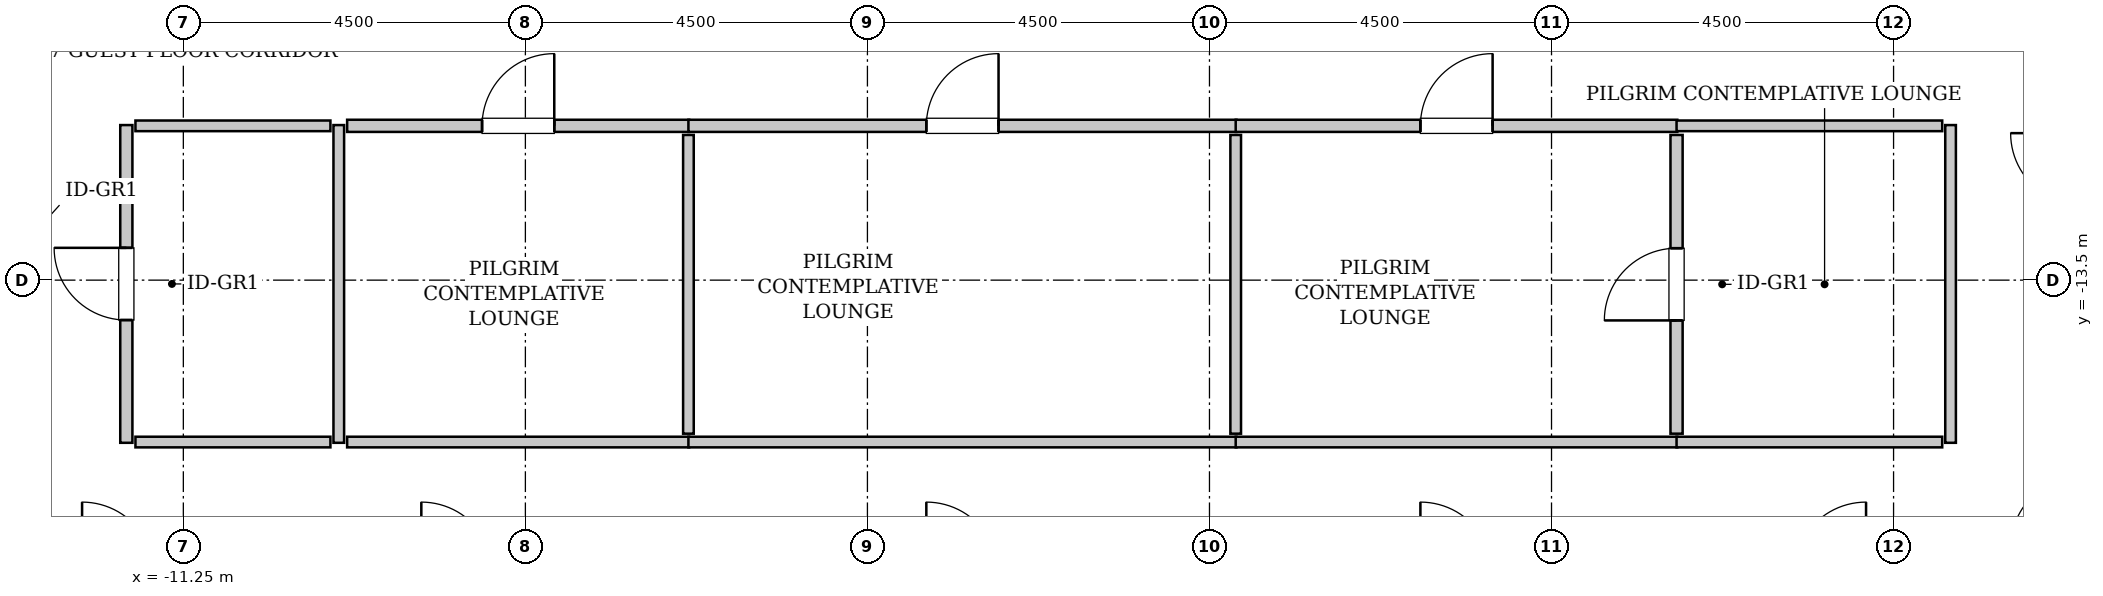
"""IFC4 building model, lengths in metres.
Left out: names, types, materials, properties, quantities, classifications, styles, units other than length and angle.
Written with IfcOpenShell. Run it as: python <this file> out.ifc"""

import sys

from ifc_helpers import new_model, si_unit, direction, frame, frame_2d, origin, place, context, subcontext, project, spatial, rectangle, extrude, source, transform, mapped, element, fill, save


model = new_model("IFC4")
c1 = context("Model", 3, precision=1e-05, world=origin(), true_north=direction((0.0, 1.0)))
c2 = subcontext(c1, "Body", "Model", "MODEL_VIEW")
j1 = project(units=[si_unit("LENGTHUNIT", "METRE"), si_unit("PLANEANGLEUNIT", "RADIAN")], contexts=[c1])
p1 = place(None, origin())
s1 = spatial("IfcSite", under=j1, at=p1, CompositionType="ELEMENT")
p2 = place(p1, origin())
s2 = spatial("IfcBuilding", under=s1, at=p2, CompositionType="ELEMENT")
p3 = place(p2, frame((0.0, 0.0, 152.6)))
s3 = spatial("IfcBuildingStorey", under=s2, at=p3, CompositionType="ELEMENT", Elevation=152.6)
m1 = source(origin(), c2, "Body", "SweptSolid", [
    extrude(rectangle(XDim=4.18, YDim=0.16, at=frame_2d((2.09, 0.0))), origin(), (0.0, 0.0, 1.0), 3.535),
])
p4 = place(p3, frame((-12.0, -15.64, 0.0), z_axis=(0.0, 0.0, 1.0), x_axis=(0.0, 1.0, 0.0)))
e1 = element("IfcWall", 1, at=p4, inside=s3, PredefinedType="PARTITIONING", context=c2, shape_type="MappedRepresentation", body=[
    mapped(m1, transform((0.0, 0.0, 0.0), x_axis=(1.0, 0.0, 0.0), y_axis=(0.0, 1.0, 0.0), z_axis=(0.0, 0.0, 1.0), scale=1.0)),
])
p5 = place(p4, frame((1.615, 0.0, 0.0)))
e2 = element("IfcOpeningElement", 2, at=p5, cuts=e1, PredefinedType="OPENING", context=c2, shape_type="SweptSolid", body=[
    extrude(rectangle(XDim=0.95, YDim=2.1, at=frame_2d((0.475, 1.05))), frame((0.0, 0.09, 0.0), z_axis=(0.0, -1.0, 0.0), x_axis=(1.0, 0.0, 0.0)), (0.0, 0.0, 1.0), 0.18),
])
m2 = source(origin(), c2, "Body", "SweptSolid", [
    extrude(rectangle(XDim=4.18, YDim=0.14, at=frame_2d((2.09, 0.0))), origin(), (0.0, 0.0, 1.0), 3.535),
])
p6 = place(p3, frame((-9.205, -15.64, 0.0), z_axis=(0.0, 0.0, 1.0), x_axis=(0.0, 1.0, 0.0)))
e3 = element("IfcWall", 3, at=p6, inside=s3, PredefinedType="PARTITIONING", context=c2, shape_type="MappedRepresentation", body=[
    mapped(m2, transform((0.0, 0.0, 0.0), x_axis=(1.0, 0.0, 0.0), y_axis=(0.0, 1.0, 0.0), z_axis=(0.0, 0.0, 1.0), scale=1.0)),
])
m3 = source(origin(), c2, "Body", "SweptSolid", [
    extrude(rectangle(XDim=2.565, YDim=0.14, at=frame_2d((1.282, 0.0))), origin(), (0.0, 0.0, 1.0), 3.535),
])
for number, where, z_axis, x_axis in (
    (4, (-11.88, -11.47, 0.0), (0.0, 0.0, 1.0), (1.0, 0.0, 0.0)),
    (5, (-11.88, -15.63, 0.0), (0.0, 0.0, 1.0), (1.0, 0.0, 0.0)),
):
    element("IfcWall", number, at=place(p3, frame(where, z_axis=z_axis, x_axis=x_axis)), inside=s3, PredefinedType="PARTITIONING", context=c2, shape_type="MappedRepresentation", body=[
        mapped(m3, transform((0.0, 0.0, 0.0), x_axis=(1.0, 0.0, 0.0), y_axis=(0.0, 1.0, 0.0), z_axis=(0.0, 0.0, 1.0), scale=1.0)),
    ])
m4 = source(origin(), c2, "Body", "SweptSolid", [
    extrude(rectangle(XDim=4.5, YDim=0.16, at=frame_2d((2.25, 0.0))), origin(), (0.0, 0.0, 1.0), 3.535),
])
p7 = place(p3, frame((-9.095, -11.47, 0.0), z_axis=(0.0, 0.0, 1.0), x_axis=(1.0, 0.0, 0.0)))
e6 = element("IfcWall", 6, at=p7, inside=s3, PredefinedType="PARTITIONING", context=c2, shape_type="MappedRepresentation", body=[
    mapped(m4, transform((0.0, 0.0, 0.0), x_axis=(1.0, 0.0, 0.0), y_axis=(0.0, 1.0, 0.0), z_axis=(0.0, 0.0, 1.0), scale=1.0)),
])
p8 = place(p7, frame((1.775, 0.0, 0.0)))
e7 = element("IfcOpeningElement", 7, at=p8, cuts=e6, PredefinedType="OPENING", context=c2, shape_type="SweptSolid", body=[
    extrude(rectangle(XDim=0.95, YDim=2.1, at=frame_2d((0.475, 1.05))), frame((0.0, 0.09, 0.0), z_axis=(0.0, -1.0, 0.0), x_axis=(1.0, 0.0, 0.0)), (0.0, 0.0, 1.0), 0.18),
])
m5 = source(origin(), c2, "Body", "SweptSolid", [
    extrude(rectangle(XDim=4.5, YDim=0.14, at=frame_2d((2.25, 0.0))), origin(), (0.0, 0.0, 1.0), 3.535),
])
p9 = place(p3, frame((-9.095, -15.63, 0.0), z_axis=(0.0, 0.0, 1.0), x_axis=(1.0, 0.0, 0.0)))
e8 = element("IfcWall", 8, at=p9, inside=s3, PredefinedType="PARTITIONING", context=c2, shape_type="MappedRepresentation", body=[
    mapped(m5, transform((0.0, 0.0, 0.0), x_axis=(1.0, 0.0, 0.0), y_axis=(0.0, 1.0, 0.0), z_axis=(0.0, 0.0, 1.0), scale=1.0)),
])
m6 = source(origin(), c2, "Body", "SweptSolid", [
    extrude(rectangle(XDim=3.93, YDim=0.14, at=frame_2d((1.965, 0.0))), origin(), (0.0, 0.0, 1.0), 3.535),
])
p10 = place(p3, frame((-4.605, -15.52, 0.0), z_axis=(0.0, 0.0, 1.0), x_axis=(0.0, 1.0, 0.0)))
e9 = element("IfcWall", 9, at=p10, inside=s3, PredefinedType="PARTITIONING", context=c2, shape_type="MappedRepresentation", body=[
    mapped(m6, transform((0.0, 0.0, 0.0), x_axis=(1.0, 0.0, 0.0), y_axis=(0.0, 1.0, 0.0), z_axis=(0.0, 0.0, 1.0), scale=1.0)),
])
m7 = source(origin(), c2, "Body", "SweptSolid", [
    extrude(rectangle(XDim=7.21, YDim=0.16, at=frame_2d((3.605, 0.0))), origin(), (0.0, 0.0, 1.0), 3.535),
])
p11 = place(p3, frame((-4.605, -11.47, 0.0), z_axis=(0.0, 0.0, 1.0), x_axis=(1.0, 0.0, 0.0)))
e10 = element("IfcWall", 10, at=p11, inside=s3, PredefinedType="PARTITIONING", context=c2, shape_type="MappedRepresentation", body=[
    mapped(m7, transform((0.0, 0.0, 0.0), x_axis=(1.0, 0.0, 0.0), y_axis=(0.0, 1.0, 0.0), z_axis=(0.0, 0.0, 1.0), scale=1.0)),
])
p12 = place(p11, frame((3.13, 0.0, 0.0)))
e11 = element("IfcOpeningElement", 11, at=p12, cuts=e10, PredefinedType="OPENING", context=c2, shape_type="SweptSolid", body=[
    extrude(rectangle(XDim=0.95, YDim=2.1, at=frame_2d((0.475, 1.05))), frame((0.0, 0.09, 0.0), z_axis=(0.0, -1.0, 0.0), x_axis=(1.0, 0.0, 0.0)), (0.0, 0.0, 1.0), 0.18),
])
m8 = source(origin(), c2, "Body", "SweptSolid", [
    extrude(rectangle(XDim=7.21, YDim=0.14, at=frame_2d((3.605, 0.0))), origin(), (0.0, 0.0, 1.0), 3.535),
])
p13 = place(p3, frame((-4.605, -15.63, 0.0), z_axis=(0.0, 0.0, 1.0), x_axis=(1.0, 0.0, 0.0)))
e12 = element("IfcWall", 12, at=p13, inside=s3, PredefinedType="PARTITIONING", context=c2, shape_type="MappedRepresentation", body=[
    mapped(m8, transform((0.0, 0.0, 0.0), x_axis=(1.0, 0.0, 0.0), y_axis=(0.0, 1.0, 0.0), z_axis=(0.0, 0.0, 1.0), scale=1.0)),
])
p14 = place(p3, frame((2.595, -15.52, 0.0), z_axis=(0.0, 0.0, 1.0), x_axis=(0.0, 1.0, 0.0)))
e13 = element("IfcWall", 13, at=p14, inside=s3, PredefinedType="PARTITIONING", context=c2, shape_type="MappedRepresentation", body=[
    mapped(m6, transform((0.0, 0.0, 0.0), x_axis=(1.0, 0.0, 0.0), y_axis=(0.0, 1.0, 0.0), z_axis=(0.0, 0.0, 1.0), scale=1.0)),
])
m9 = source(origin(), c2, "Body", "SweptSolid", [
    extrude(rectangle(XDim=5.81, YDim=0.16, at=frame_2d((2.905, 0.0))), origin(), (0.0, 0.0, 1.0), 3.535),
])
p15 = place(p3, frame((2.595, -11.47, 0.0), z_axis=(0.0, 0.0, 1.0), x_axis=(1.0, 0.0, 0.0)))
e14 = element("IfcWall", 14, at=p15, inside=s3, PredefinedType="PARTITIONING", context=c2, shape_type="MappedRepresentation", body=[
    mapped(m9, transform((0.0, 0.0, 0.0), x_axis=(1.0, 0.0, 0.0), y_axis=(0.0, 1.0, 0.0), z_axis=(0.0, 0.0, 1.0), scale=1.0)),
])
p16 = place(p15, frame((2.43, 0.0, 0.0)))
e15 = element("IfcOpeningElement", 15, at=p16, cuts=e14, PredefinedType="OPENING", context=c2, shape_type="SweptSolid", body=[
    extrude(rectangle(XDim=0.95, YDim=2.1, at=frame_2d((0.475, 1.05))), frame((0.0, 0.09, 0.0), z_axis=(0.0, -1.0, 0.0), x_axis=(1.0, 0.0, 0.0)), (0.0, 0.0, 1.0), 0.18),
])
m10 = source(origin(), c2, "Body", "SweptSolid", [
    extrude(rectangle(XDim=5.81, YDim=0.14, at=frame_2d((2.905, 0.0))), origin(), (0.0, 0.0, 1.0), 3.535),
])
p17 = place(p3, frame((2.595, -15.63, 0.0), z_axis=(0.0, 0.0, 1.0), x_axis=(1.0, 0.0, 0.0)))
e16 = element("IfcWall", 16, at=p17, inside=s3, PredefinedType="PARTITIONING", context=c2, shape_type="MappedRepresentation", body=[
    mapped(m10, transform((0.0, 0.0, 0.0), x_axis=(1.0, 0.0, 0.0), y_axis=(0.0, 1.0, 0.0), z_axis=(0.0, 0.0, 1.0), scale=1.0)),
])
m11 = source(origin(), c2, "Body", "SweptSolid", [
    extrude(rectangle(XDim=3.93, YDim=0.16, at=frame_2d((1.965, 0.0))), origin(), (0.0, 0.0, 1.0), 3.535),
])
p18 = place(p3, frame((8.395, -15.52, 0.0), z_axis=(0.0, 0.0, 1.0), x_axis=(0.0, 1.0, 0.0)))
e17 = element("IfcWall", 17, at=p18, inside=s3, PredefinedType="PARTITIONING", context=c2, shape_type="MappedRepresentation", body=[
    mapped(m11, transform((0.0, 0.0, 0.0), x_axis=(1.0, 0.0, 0.0), y_axis=(0.0, 1.0, 0.0), z_axis=(0.0, 0.0, 1.0), scale=1.0)),
])
p19 = place(p18, frame((1.49, 0.0, 0.0)))
e18 = element("IfcOpeningElement", 18, at=p19, cuts=e17, PredefinedType="OPENING", context=c2, shape_type="SweptSolid", body=[
    extrude(rectangle(XDim=0.95, YDim=2.1, at=frame_2d((0.475, 1.05))), frame((0.0, 0.09, 0.0), z_axis=(0.0, -1.0, 0.0), x_axis=(1.0, 0.0, 0.0)), (0.0, 0.0, 1.0), 0.18),
])
p20 = place(p3, frame((12.0, -15.64, 0.0), z_axis=(0.0, 0.0, 1.0), x_axis=(0.0, 1.0, 0.0)))
e19 = element("IfcWall", 19, at=p20, inside=s3, PredefinedType="PARTITIONING", context=c2, shape_type="MappedRepresentation", body=[
    mapped(m2, transform((0.0, 0.0, 0.0), x_axis=(1.0, 0.0, 0.0), y_axis=(0.0, 1.0, 0.0), z_axis=(0.0, 0.0, 1.0), scale=1.0)),
])
m12 = source(origin(), c2, "Body", "SweptSolid", [
    extrude(rectangle(XDim=3.495, YDim=0.14, at=frame_2d((1.748, 0.0))), origin(), (0.0, 0.0, 1.0), 3.535),
])
for number, where, z_axis, x_axis in (
    (20, (8.395, -11.47, 0.0), (0.0, 0.0, 1.0), (1.0, 0.0, 0.0)),
    (21, (8.395, -15.63, 0.0), (0.0, 0.0, 1.0), (1.0, 0.0, 0.0)),
):
    element("IfcWall", number, at=place(p3, frame(where, z_axis=z_axis, x_axis=x_axis)), inside=s3, PredefinedType="PARTITIONING", context=c2, shape_type="MappedRepresentation", body=[
        mapped(m12, transform((0.0, 0.0, 0.0), x_axis=(1.0, 0.0, 0.0), y_axis=(0.0, 1.0, 0.0), z_axis=(0.0, 0.0, 1.0), scale=1.0)),
    ])
m13 = source(origin(), c2, "Body", "SweptSolid", [
    extrude(rectangle(XDim=0.95, YDim=2.1, at=frame_2d((0.475, 1.05))), frame((0.0, 0.025, 0.0), z_axis=(0.0, -1.0, 0.0), x_axis=(1.0, 0.0, 0.0)), (0.0, 0.0, 1.0), 0.05),
])
p21 = place(p5, origin())
e22 = element("IfcDoor", 22, at=p21, inside=s3, OperationType="SINGLE_SWING_RIGHT", PredefinedType="DOOR", context=c2, shape_type="MappedRepresentation", body=[
    mapped(m13, transform((0.0, 0.0, 0.0), x_axis=(1.0, 0.0, 0.0), y_axis=(0.0, 1.0, 0.0), z_axis=(0.0, 0.0, 1.0), scale=1.0)),
])
fill(e2, e22)
p22 = place(p8, origin())
e23 = element("IfcDoor", 23, at=p22, inside=s3, OperationType="SINGLE_SWING_RIGHT", PredefinedType="DOOR", context=c2, shape_type="MappedRepresentation", body=[
    mapped(m13, transform((0.0, 0.0, 0.0), x_axis=(1.0, 0.0, 0.0), y_axis=(0.0, 1.0, 0.0), z_axis=(0.0, 0.0, 1.0), scale=1.0)),
])
fill(e7, e23)
p23 = place(p12, origin())
e24 = element("IfcDoor", 24, at=p23, inside=s3, OperationType="SINGLE_SWING_RIGHT", PredefinedType="DOOR", context=c2, shape_type="MappedRepresentation", body=[
    mapped(m13, transform((0.0, 0.0, 0.0), x_axis=(1.0, 0.0, 0.0), y_axis=(0.0, 1.0, 0.0), z_axis=(0.0, 0.0, 1.0), scale=1.0)),
])
fill(e11, e24)
p24 = place(p16, origin())
e25 = element("IfcDoor", 25, at=p24, inside=s3, OperationType="SINGLE_SWING_RIGHT", PredefinedType="DOOR", context=c2, shape_type="MappedRepresentation", body=[
    mapped(m13, transform((0.0, 0.0, 0.0), x_axis=(1.0, 0.0, 0.0), y_axis=(0.0, 1.0, 0.0), z_axis=(0.0, 0.0, 1.0), scale=1.0)),
])
fill(e15, e25)
p25 = place(p19, origin())
e26 = element("IfcDoor", 26, at=p25, inside=s3, OperationType="SINGLE_SWING_LEFT", PredefinedType="DOOR", context=c2, shape_type="MappedRepresentation", body=[
    mapped(m13, transform((0.0, 0.0, 0.0), x_axis=(1.0, 0.0, 0.0), y_axis=(0.0, 1.0, 0.0), z_axis=(0.0, 0.0, 1.0), scale=1.0)),
])
fill(e18, e26)
save(model, sys.argv[1])
